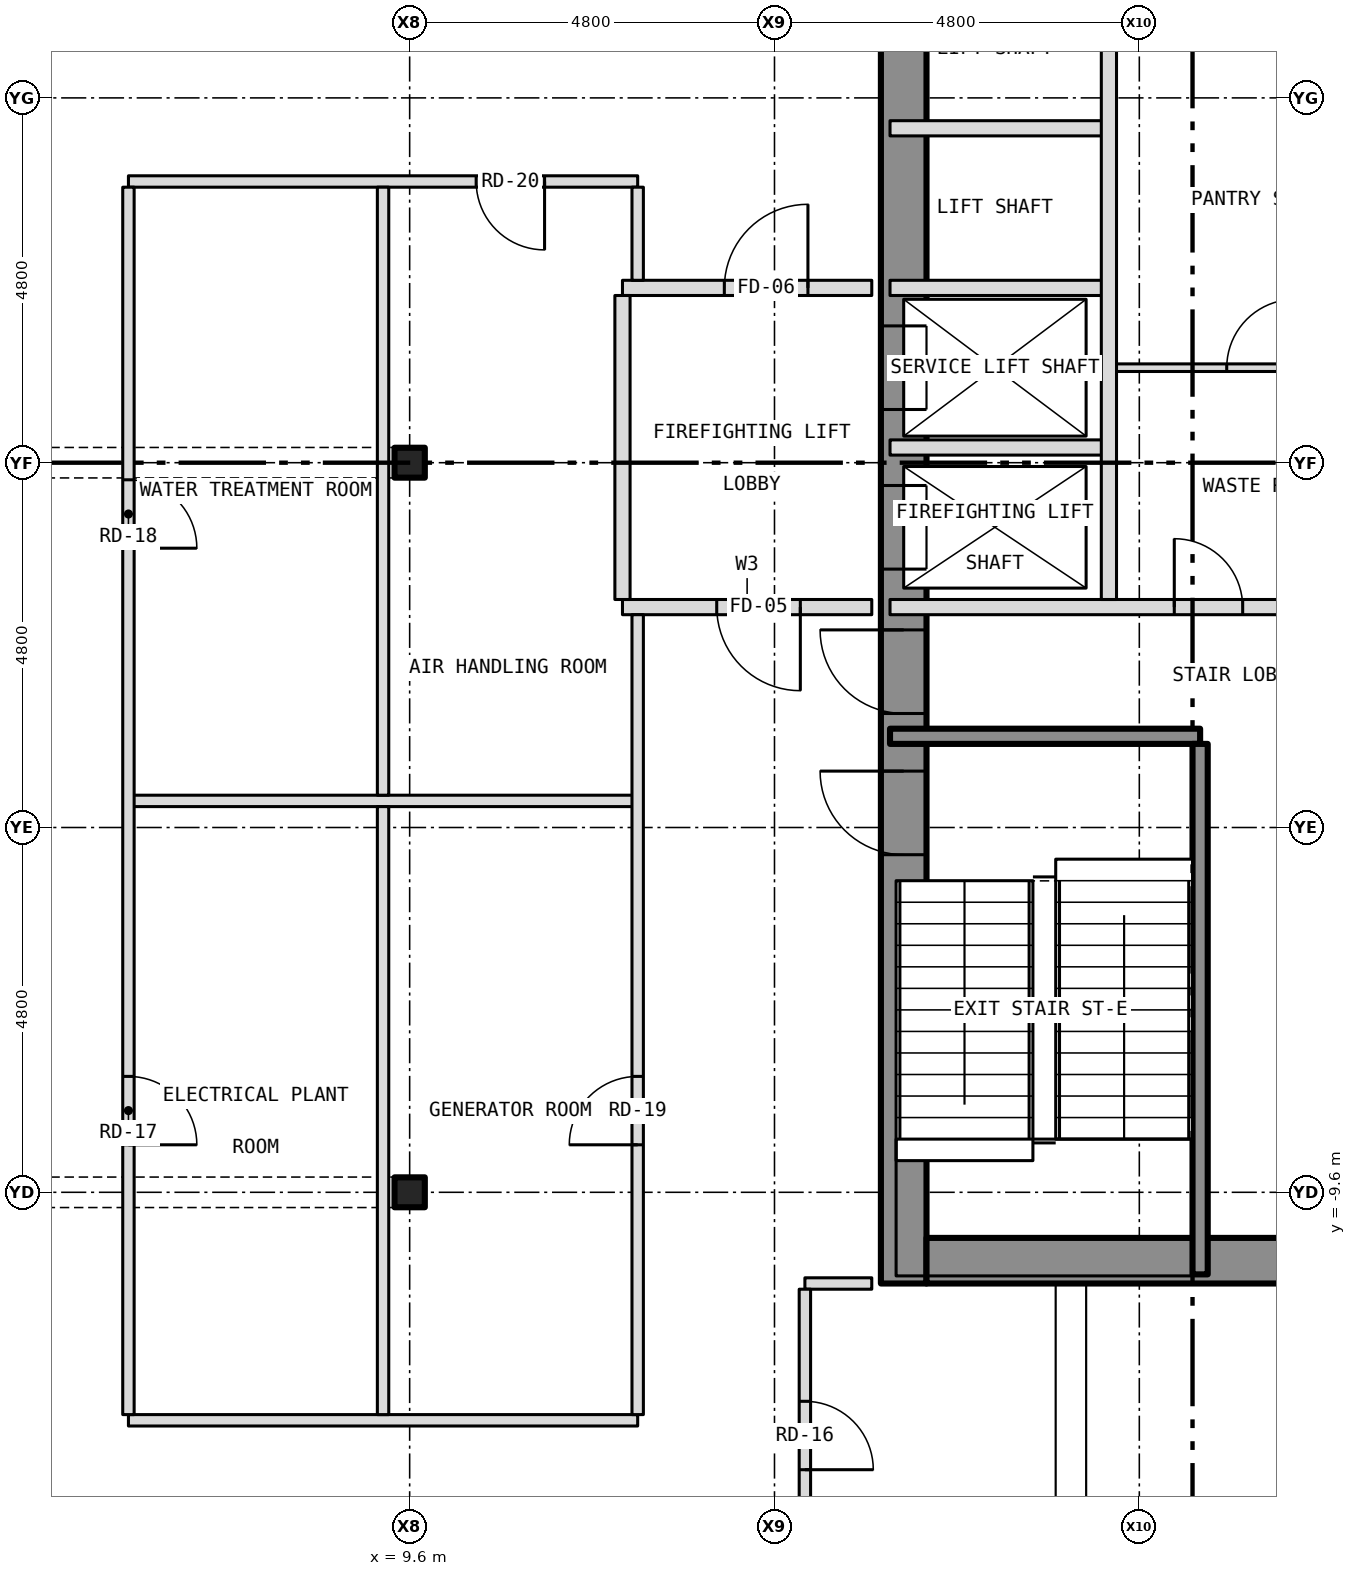
"""IFC4 building model, lengths in metres.
Left out: names, types, materials, properties, quantities, classifications, styles, units other than length and angle.
Written with IfcOpenShell. Run it as: python <this file> out.ifc"""

import sys

from ifc_helpers import new_model, si_unit, direction, frame, frame_2d, origin, origin_2d, place, context, subcontext, project, spatial, rectangle, i_section, extrude, element, fill, save


model = new_model("IFC4")
c1 = context("Model", 3, precision=1e-05, world=origin(), true_north=direction((0.0, 1.0)))
c2 = subcontext(c1, "Body", "Model", "MODEL_VIEW")
j1 = project(units=[si_unit("LENGTHUNIT", "METRE"), si_unit("PLANEANGLEUNIT", "RADIAN")], contexts=[c1])
p1 = place(None, origin())
s1 = spatial("IfcSite", under=j1, at=p1, CompositionType="ELEMENT")
p2 = place(p1, origin())
s2 = spatial("IfcBuilding", under=s1, at=p2, CompositionType="ELEMENT")
p3 = place(p2, frame((0.0, 0.0, 138.0)))
s3 = spatial("IfcBuildingStorey", under=s2, at=p3, CompositionType="ELEMENT", Elevation=138.0)
for number, where, z_axis, x_axis in (
    (1, (9.6, -9.6, -0.3), (0.0, 0.0, 1.0), (1.0, 0.0, 0.0)),
    (2, (9.6, 0.0, -0.3), (0.0, 0.0, 1.0), (1.0, 0.0, 0.0)),
):
    element("IfcColumn", number, at=place(p3, frame(where, z_axis=z_axis, x_axis=x_axis)), inside=s3, PredefinedType="COLUMN", context=c2, shape_type="SweptSolid", body=[
        extrude(i_section(OverallWidth=0.399, OverallDepth=0.394, WebThickness=0.023, FlangeThickness=0.037, at=origin_2d()), origin(), (0.0, 0.0, 1.0), 4.6),
    ])
p4 = place(p3, frame((16.1, -10.8, 0.0), z_axis=(0.0, 0.0, 1.0), x_axis=(0.0, 1.0, 0.0)))
e3 = element("IfcWall", 3, at=p4, inside=s3, PredefinedType="SHEAR", context=c2, shape_type="SweptSolid", body=[
    extrude(rectangle(XDim=21.6, YDim=0.6, at=frame_2d((10.8, 0.0))), origin(), (0.0, 0.0, 1.0), 3.9),
])
p5 = place(p4, frame((9.4, 0.0, 0.0)))
e4 = element("IfcOpeningElement", 4, at=p5, cuts=e3, PredefinedType="OPENING", context=c2, shape_type="SweptSolid", body=[
    extrude(rectangle(XDim=1.1, YDim=2.1, at=frame_2d((0.55, 1.05))), frame((0.0, 0.312, 0.0), z_axis=(0.0, -1.0, 0.0), x_axis=(1.0, 0.0, 0.0)), (0.0, 0.0, 1.0), 0.624),
])
p6 = place(p4, frame((11.5, 0.0, 0.0)))
e5 = element("IfcOpeningElement", 5, at=p6, cuts=e3, PredefinedType="OPENING", context=c2, shape_type="SweptSolid", body=[
    extrude(rectangle(XDim=1.1, YDim=2.1, at=frame_2d((0.55, 1.05))), frame((0.0, 0.312, 0.0), z_axis=(0.0, -1.0, 0.0), x_axis=(1.0, 0.0, 0.0)), (0.0, 0.0, 1.0), 0.624),
])
p7 = place(p4, frame((5.642, 0.0, 0.0)))
e6 = element("IfcOpeningElement", 6, at=p7, cuts=e3, PredefinedType="OPENING", context=c2, shape_type="SweptSolid", body=[
    extrude(rectangle(XDim=1.1, YDim=2.1, at=frame_2d((0.55, 1.05))), frame((0.0, 0.312, 0.0), z_axis=(0.0, -1.0, 0.0), x_axis=(1.0, 0.0, 0.0)), (0.0, 0.0, 1.0), 0.624),
])
p8 = place(p4, frame((7.5, 0.0, 0.0)))
e7 = element("IfcOpeningElement", 7, at=p8, cuts=e3, PredefinedType="OPENING", context=c2, shape_type="SweptSolid", body=[
    extrude(rectangle(XDim=1.1, YDim=2.1, at=frame_2d((0.55, 1.05))), frame((0.0, 0.312, 0.0), z_axis=(0.0, -1.0, 0.0), x_axis=(1.0, 0.0, 0.0)), (0.0, 0.0, 1.0), 0.624),
])
p9 = place(p3, frame((16.4, -10.5, 0.0), z_axis=(0.0, 0.0, 1.0), x_axis=(1.0, 0.0, 0.0)))
e8 = element("IfcWall", 8, at=p9, inside=s3, PredefinedType="SHEAR", context=c2, shape_type="SweptSolid", body=[
    extrude(rectangle(XDim=5.8, YDim=0.6, at=frame_2d((2.9, 0.0))), origin(), (0.0, 0.0, 1.0), 3.9),
])
p10 = place(p3, frame((5.9, -12.6, 0.0), z_axis=(0.0, 0.0, 1.0), x_axis=(1.0, 0.0, 0.0)))
e9 = element("IfcWall", 9, at=p10, inside=s3, PredefinedType="PARTITIONING", context=c2, shape_type="SweptSolid", body=[
    extrude(rectangle(XDim=6.7, YDim=0.15, at=frame_2d((3.35, 0.0))), origin(), (0.0, 0.0, 1.0), 4.3),
])
p11 = place(p3, frame((14.8, -10.8, 0.0), z_axis=(0.0, 0.0, 1.0), x_axis=(1.0, 0.0, 0.0)))
e10 = element("IfcWall", 10, at=p11, inside=s3, PredefinedType="PARTITIONING", context=c2, shape_type="SweptSolid", body=[
    extrude(rectangle(XDim=0.88, YDim=0.15, at=frame_2d((0.44, 0.0))), origin(), (0.0, 0.0, 1.0), 4.3),
])
p12 = place(p3, frame((5.9, -4.45, 0.0), z_axis=(0.0, 0.0, 1.0), x_axis=(1.0, 0.0, 0.0)))
e11 = element("IfcWall", 11, at=p12, inside=s3, PredefinedType="PARTITIONING", context=c2, shape_type="SweptSolid", body=[
    extrude(rectangle(XDim=6.7, YDim=0.15, at=frame_2d((3.35, 0.0))), origin(), (0.0, 0.0, 1.0), 4.3),
])
p13 = place(p3, frame((15.92, -3.6, 0.0), z_axis=(0.0, 0.0, 1.0), x_axis=(1.0, 0.0, 0.0)))
e12 = element("IfcWall", 12, at=p13, inside=s3, PredefinedType="SHEAR", context=c2, shape_type="SweptSolid", body=[
    extrude(rectangle(XDim=4.08, YDim=0.2, at=frame_2d((2.04, 0.0))), origin(), (0.0, 0.0, 1.0), 3.9),
])
p14 = place(p3, frame((12.4, -1.9, 0.0), z_axis=(0.0, 0.0, 1.0), x_axis=(1.0, 0.0, 0.0)))
e13 = element("IfcWall", 13, at=p14, inside=s3, PredefinedType="PARTITIONING", context=c2, shape_type="SweptSolid", body=[
    extrude(rectangle(XDim=3.28, YDim=0.2, at=frame_2d((1.64, 0.0))), origin(), (0.0, 0.0, 1.0), 4.3),
])
p15 = place(p14, frame((1.24, 0.0, 0.0)))
e14 = element("IfcOpeningElement", 14, at=p15, cuts=e13, PredefinedType="OPENING", context=c2, shape_type="SweptSolid", body=[
    extrude(rectangle(XDim=1.1, YDim=2.1, at=frame_2d((0.55, 1.05))), frame((0.0, 0.112, 0.0), z_axis=(0.0, -1.0, 0.0), x_axis=(1.0, 0.0, 0.0)), (0.0, 0.0, 1.0), 0.224),
])
p16 = place(p3, frame((15.92, -1.9, 0.0), z_axis=(0.0, 0.0, 1.0), x_axis=(1.0, 0.0, 0.0)))
e15 = element("IfcWall", 15, at=p16, inside=s3, PredefinedType="PARTITIONING", context=c2, shape_type="SweptSolid", body=[
    extrude(rectangle(XDim=6.76, YDim=0.2, at=frame_2d((3.38, 0.0))), origin(), (0.0, 0.0, 1.0), 3.9),
])
p17 = place(p16, frame((3.74, 0.0, 0.0)))
e16 = element("IfcOpeningElement", 16, at=p17, cuts=e15, PredefinedType="OPENING", context=c2, shape_type="SweptSolid", body=[
    extrude(rectangle(XDim=0.9, YDim=2.1, at=frame_2d((0.45, 1.05))), frame((0.0, 0.112, 0.0), z_axis=(0.0, -1.0, 0.0), x_axis=(1.0, 0.0, 0.0)), (0.0, 0.0, 1.0), 0.224),
])
p18 = place(p3, frame((15.92, 0.2, 0.0), z_axis=(0.0, 0.0, 1.0), x_axis=(1.0, 0.0, 0.0)))
e17 = element("IfcWall", 17, at=p18, inside=s3, PredefinedType="PARTITIONING", context=c2, shape_type="SweptSolid", body=[
    extrude(rectangle(XDim=2.88, YDim=0.2, at=frame_2d((1.44, 0.0))), origin(), (0.0, 0.0, 1.0), 3.9),
])
p19 = place(p3, frame((18.8, 1.25, 0.0), z_axis=(0.0, 0.0, 1.0), x_axis=(1.0, 0.0, 0.0)))
e18 = element("IfcWall", 18, at=p19, inside=s3, PredefinedType="PARTITIONING", context=c2, shape_type="SweptSolid", body=[
    extrude(rectangle(XDim=3.88, YDim=0.1, at=frame_2d((1.94, 0.0))), origin(), (0.0, 0.0, 1.0), 3.9),
])
p20 = place(p19, frame((1.55, 0.0, 0.0)))
e19 = element("IfcOpeningElement", 19, at=p20, cuts=e18, PredefinedType="OPENING", context=c2, shape_type="SweptSolid", body=[
    extrude(rectangle(XDim=0.9, YDim=2.1, at=frame_2d((0.45, 1.05))), frame((0.0, 0.062, 0.0), z_axis=(0.0, -1.0, 0.0), x_axis=(1.0, 0.0, 0.0)), (0.0, 0.0, 1.0), 0.124),
])
p21 = place(p3, frame((12.4, 2.3, 0.0), z_axis=(0.0, 0.0, 1.0), x_axis=(1.0, 0.0, 0.0)))
e20 = element("IfcWall", 20, at=p21, inside=s3, PredefinedType="PARTITIONING", context=c2, shape_type="SweptSolid", body=[
    extrude(rectangle(XDim=3.28, YDim=0.2, at=frame_2d((1.64, 0.0))), origin(), (0.0, 0.0, 1.0), 4.3),
])
p22 = place(p21, frame((1.34, 0.0, 0.0)))
e21 = element("IfcOpeningElement", 21, at=p22, cuts=e20, PredefinedType="OPENING", context=c2, shape_type="SweptSolid", body=[
    extrude(rectangle(XDim=1.1, YDim=2.1, at=frame_2d((0.55, 1.05))), frame((0.0, 0.112, 0.0), z_axis=(0.0, -1.0, 0.0), x_axis=(1.0, 0.0, 0.0)), (0.0, 0.0, 1.0), 0.224),
])
p23 = place(p3, frame((15.92, 2.3, 0.0), z_axis=(0.0, 0.0, 1.0), x_axis=(1.0, 0.0, 0.0)))
e22 = element("IfcWall", 22, at=p23, inside=s3, PredefinedType="PARTITIONING", context=c2, shape_type="SweptSolid", body=[
    extrude(rectangle(XDim=2.88, YDim=0.2, at=frame_2d((1.44, 0.0))), origin(), (0.0, 0.0, 1.0), 3.9),
])
p24 = place(p3, frame((5.9, 3.7, 0.0), z_axis=(0.0, 0.0, 1.0), x_axis=(1.0, 0.0, 0.0)))
e23 = element("IfcWall", 23, at=p24, inside=s3, PredefinedType="PARTITIONING", context=c2, shape_type="SweptSolid", body=[
    extrude(rectangle(XDim=6.7, YDim=0.15, at=frame_2d((3.35, 0.0))), origin(), (0.0, 0.0, 1.0), 4.3),
])
p25 = place(p24, frame((4.575, 0.0, 0.0)))
e24 = element("IfcOpeningElement", 24, at=p25, cuts=e23, PredefinedType="OPENING", context=c2, shape_type="SweptSolid", body=[
    extrude(rectangle(XDim=0.9, YDim=2.1, at=frame_2d((0.45, 1.05))), frame((0.0, 0.087, 0.0), z_axis=(0.0, -1.0, 0.0), x_axis=(1.0, 0.0, 0.0)), (0.0, 0.0, 1.0), 0.174),
])
p26 = place(p3, frame((15.92, 4.4, 0.0), z_axis=(0.0, 0.0, 1.0), x_axis=(1.0, 0.0, 0.0)))
e25 = element("IfcWall", 25, at=p26, inside=s3, PredefinedType="PARTITIONING", context=c2, shape_type="SweptSolid", body=[
    extrude(rectangle(XDim=2.88, YDim=0.2, at=frame_2d((1.44, 0.0))), origin(), (0.0, 0.0, 1.0), 3.9),
])
p27 = place(p3, frame((5.9, -12.525, 0.0), z_axis=(0.0, 0.0, 1.0), x_axis=(0.0, 1.0, 0.0)))
e26 = element("IfcWall", 26, at=p27, inside=s3, PredefinedType="PARTITIONING", context=c2, shape_type="SweptSolid", body=[
    extrude(rectangle(XDim=16.15, YDim=0.15, at=frame_2d((8.075, 0.0))), origin(), (0.0, 0.0, 1.0), 4.3),
])
p28 = place(p27, frame((3.55, 0.0, 0.0)))
e27 = element("IfcOpeningElement", 27, at=p28, cuts=e26, PredefinedType="OPENING", context=c2, shape_type="SweptSolid", body=[
    extrude(rectangle(XDim=0.9, YDim=2.1, at=frame_2d((0.45, 1.05))), frame((0.0, 0.087, 0.0), z_axis=(0.0, -1.0, 0.0), x_axis=(1.0, 0.0, 0.0)), (0.0, 0.0, 1.0), 0.174),
])
p29 = place(p27, frame((11.4, 0.0, 0.0)))
e28 = element("IfcOpeningElement", 28, at=p29, cuts=e26, PredefinedType="OPENING", context=c2, shape_type="SweptSolid", body=[
    extrude(rectangle(XDim=0.9, YDim=2.1, at=frame_2d((0.45, 1.05))), frame((0.0, 0.087, 0.0), z_axis=(0.0, -1.0, 0.0), x_axis=(1.0, 0.0, 0.0)), (0.0, 0.0, 1.0), 0.174),
])
for number, where, z_axis, x_axis in (
    (29, (9.25, -12.525, 0.0), (0.0, 0.0, 1.0), (0.0, 1.0, 0.0)),
    (30, (9.25, -4.375, 0.0), (0.0, 0.0, 1.0), (0.0, 1.0, 0.0)),
):
    element("IfcWall", number, at=place(p3, frame(where, z_axis=z_axis, x_axis=x_axis)), inside=s3, PredefinedType="PARTITIONING", context=c2, shape_type="SweptSolid", body=[
        extrude(rectangle(XDim=8.0, YDim=0.15, at=frame_2d((4.0, 0.0))), origin(), (0.0, 0.0, 1.0), 4.3),
    ])
p30 = place(p3, frame((12.4, -1.8, 0.0), z_axis=(0.0, 0.0, 1.0), x_axis=(0.0, 1.0, 0.0)))
e31 = element("IfcWall", 31, at=p30, inside=s3, PredefinedType="PARTITIONING", context=c2, shape_type="SweptSolid", body=[
    extrude(rectangle(XDim=4.0, YDim=0.2, at=frame_2d((2.0, 0.0))), origin(), (0.0, 0.0, 1.0), 4.3),
])
p31 = place(p3, frame((12.6, -12.525, 0.0), z_axis=(0.0, 0.0, 1.0), x_axis=(0.0, 1.0, 0.0)))
e32 = element("IfcWall", 32, at=p31, inside=s3, PredefinedType="PARTITIONING", context=c2, shape_type="SweptSolid", body=[
    extrude(rectangle(XDim=10.525, YDim=0.15, at=frame_2d((5.262, 0.0))), origin(), (0.0, 0.0, 1.0), 4.3),
])
p32 = place(p31, frame((3.55, 0.0, 0.0)))
e33 = element("IfcOpeningElement", 33, at=p32, cuts=e32, PredefinedType="OPENING", context=c2, shape_type="SweptSolid", body=[
    extrude(rectangle(XDim=0.9, YDim=2.1, at=frame_2d((0.45, 1.05))), frame((0.0, 0.087, 0.0), z_axis=(0.0, -1.0, 0.0), x_axis=(1.0, 0.0, 0.0)), (0.0, 0.0, 1.0), 0.174),
])
p33 = place(p3, frame((12.6, 2.4, 0.0), z_axis=(0.0, 0.0, 1.0), x_axis=(0.0, 1.0, 0.0)))
e34 = element("IfcWall", 34, at=p33, inside=s3, PredefinedType="PARTITIONING", context=c2, shape_type="SweptSolid", body=[
    extrude(rectangle(XDim=1.225, YDim=0.15, at=frame_2d((0.613, 0.0))), origin(), (0.0, 0.0, 1.0), 4.3),
])
p34 = place(p3, frame((14.8, -14.725, 0.0), z_axis=(0.0, 0.0, 1.0), x_axis=(0.0, 1.0, 0.0)))
e35 = element("IfcWall", 35, at=p34, inside=s3, PredefinedType="PARTITIONING", context=c2, shape_type="SweptSolid", body=[
    extrude(rectangle(XDim=3.85, YDim=0.15, at=frame_2d((1.925, 0.0))), origin(), (0.0, 0.0, 1.0), 4.3),
])
p35 = place(p34, frame((1.475, 0.0, 0.0)))
e36 = element("IfcOpeningElement", 36, at=p35, cuts=e35, PredefinedType="OPENING", context=c2, shape_type="SweptSolid", body=[
    extrude(rectangle(XDim=0.9, YDim=2.1, at=frame_2d((0.45, 1.05))), frame((0.0, 0.087, 0.0), z_axis=(0.0, -1.0, 0.0), x_axis=(1.0, 0.0, 0.0)), (0.0, 0.0, 1.0), 0.174),
])
p36 = place(p3, frame((18.8, -1.8, 0.0), z_axis=(0.0, 0.0, 1.0), x_axis=(0.0, 1.0, 0.0)))
e37 = element("IfcWall", 37, at=p36, inside=s3, PredefinedType="PARTITIONING", context=c2, shape_type="SweptSolid", body=[
    extrude(rectangle(XDim=12.48, YDim=0.2, at=frame_2d((6.24, 0.0))), origin(), (0.0, 0.0, 1.0), 3.9),
])
p37 = place(p3, frame((20.0, -10.68, 0.0), z_axis=(0.0, 0.0, 1.0), x_axis=(0.0, 1.0, 0.0)))
e38 = element("IfcWall", 38, at=p37, inside=s3, PredefinedType="SHEAR", context=c2, shape_type="SweptSolid", body=[
    extrude(rectangle(XDim=6.98, YDim=0.2, at=frame_2d((3.49, 0.0))), origin(), (0.0, 0.0, 1.0), 3.9),
])
p38 = place(p5, origin())
e39 = element("IfcDoor", 39, at=p38, inside=s3, OperationType="SLIDING_TO_LEFT", PredefinedType="DOOR", context=c2, shape_type="SweptSolid", body=[
    extrude(rectangle(XDim=1.1, YDim=2.1, at=frame_2d((0.55, 1.05))), frame((0.0, 0.025, 0.0), z_axis=(0.0, -1.0, 0.0), x_axis=(1.0, 0.0, 0.0)), (0.0, 0.0, 1.0), 0.05),
])
fill(e4, e39)
p39 = place(p6, origin())
e40 = element("IfcDoor", 40, at=p39, inside=s3, OperationType="SLIDING_TO_LEFT", PredefinedType="DOOR", context=c2, shape_type="SweptSolid", body=[
    extrude(rectangle(XDim=1.1, YDim=2.1, at=frame_2d((0.55, 1.05))), frame((0.0, 0.025, 0.0), z_axis=(0.0, -1.0, 0.0), x_axis=(1.0, 0.0, 0.0)), (0.0, 0.0, 1.0), 0.05),
])
fill(e5, e40)
p40 = place(p7, origin())
e41 = element("IfcDoor", 41, at=p40, inside=s3, OperationType="SINGLE_SWING_RIGHT", PredefinedType="DOOR", context=c2, shape_type="SweptSolid", body=[
    extrude(rectangle(XDim=1.1, YDim=2.1, at=frame_2d((0.55, 1.05))), frame((0.0, 0.025, 0.0), z_axis=(0.0, -1.0, 0.0), x_axis=(1.0, 0.0, 0.0)), (0.0, 0.0, 1.0), 0.05),
])
fill(e6, e41)
p41 = place(p8, origin())
e42 = element("IfcDoor", 42, at=p41, inside=s3, OperationType="SINGLE_SWING_RIGHT", PredefinedType="DOOR", context=c2, shape_type="SweptSolid", body=[
    extrude(rectangle(XDim=1.1, YDim=2.1, at=frame_2d((0.55, 1.05))), frame((0.0, 0.025, 0.0), z_axis=(0.0, -1.0, 0.0), x_axis=(1.0, 0.0, 0.0)), (0.0, 0.0, 1.0), 0.05),
])
fill(e7, e42)
p42 = place(p17, origin())
e43 = element("IfcDoor", 43, at=p42, inside=s3, OperationType="SINGLE_SWING_LEFT", PredefinedType="DOOR", context=c2, shape_type="SweptSolid", body=[
    extrude(rectangle(XDim=0.9, YDim=2.1, at=frame_2d((0.45, 1.05))), frame((0.0, 0.025, 0.0), z_axis=(0.0, -1.0, 0.0), x_axis=(1.0, 0.0, 0.0)), (0.0, 0.0, 1.0), 0.05),
])
fill(e16, e43)
p43 = place(p20, origin())
e44 = element("IfcDoor", 44, at=p43, inside=s3, OperationType="SINGLE_SWING_RIGHT", PredefinedType="DOOR", context=c2, shape_type="SweptSolid", body=[
    extrude(rectangle(XDim=0.9, YDim=2.1, at=frame_2d((0.45, 1.05))), frame((0.0, 0.025, 0.0), z_axis=(0.0, -1.0, 0.0), x_axis=(1.0, 0.0, 0.0)), (0.0, 0.0, 1.0), 0.05),
])
fill(e19, e44)
p44 = place(p15, origin())
e45 = element("IfcDoor", 45, at=p44, inside=s3, OperationType="SINGLE_SWING_RIGHT", PredefinedType="DOOR", context=c2, shape_type="SweptSolid", body=[
    extrude(rectangle(XDim=1.1, YDim=2.1, at=frame_2d((0.55, 1.05))), frame((0.0, 0.025, 0.0), z_axis=(0.0, -1.0, 0.0), x_axis=(1.0, 0.0, 0.0)), (0.0, 0.0, 1.0), 0.05),
])
fill(e14, e45)
p45 = place(p22, origin())
e46 = element("IfcDoor", 46, at=p45, inside=s3, OperationType="SINGLE_SWING_RIGHT", PredefinedType="DOOR", context=c2, shape_type="SweptSolid", body=[
    extrude(rectangle(XDim=1.1, YDim=2.1, at=frame_2d((0.55, 1.05))), frame((0.0, 0.025, 0.0), z_axis=(0.0, -1.0, 0.0), x_axis=(1.0, 0.0, 0.0)), (0.0, 0.0, 1.0), 0.05),
])
fill(e21, e46)
p46 = place(p35, origin())
e47 = element("IfcDoor", 47, at=p46, inside=s3, OperationType="SINGLE_SWING_LEFT", PredefinedType="DOOR", context=c2, shape_type="SweptSolid", body=[
    extrude(rectangle(XDim=0.9, YDim=2.1, at=frame_2d((0.45, 1.05))), frame((0.0, 0.025, 0.0), z_axis=(0.0, -1.0, 0.0), x_axis=(1.0, 0.0, 0.0)), (0.0, 0.0, 1.0), 0.05),
])
fill(e36, e47)
p47 = place(p28, origin())
e48 = element("IfcDoor", 48, at=p47, inside=s3, OperationType="SINGLE_SWING_LEFT", PredefinedType="DOOR", context=c2, shape_type="SweptSolid", body=[
    extrude(rectangle(XDim=0.9, YDim=2.1, at=frame_2d((0.45, 1.05))), frame((0.0, 0.025, 0.0), z_axis=(0.0, -1.0, 0.0), x_axis=(1.0, 0.0, 0.0)), (0.0, 0.0, 1.0), 0.05),
])
fill(e27, e48)
p48 = place(p29, origin())
e49 = element("IfcDoor", 49, at=p48, inside=s3, OperationType="SINGLE_SWING_LEFT", PredefinedType="DOOR", context=c2, shape_type="SweptSolid", body=[
    extrude(rectangle(XDim=0.9, YDim=2.1, at=frame_2d((0.45, 1.05))), frame((0.0, 0.025, 0.0), z_axis=(0.0, -1.0, 0.0), x_axis=(1.0, 0.0, 0.0)), (0.0, 0.0, 1.0), 0.05),
])
fill(e28, e49)
p49 = place(p32, origin())
e50 = element("IfcDoor", 50, at=p49, inside=s3, OperationType="SINGLE_SWING_LEFT", PredefinedType="DOOR", context=c2, shape_type="SweptSolid", body=[
    extrude(rectangle(XDim=0.9, YDim=2.1, at=frame_2d((0.45, 1.05))), frame((0.0, 0.025, 0.0), z_axis=(0.0, -1.0, 0.0), x_axis=(1.0, 0.0, 0.0)), (0.0, 0.0, 1.0), 0.05),
])
fill(e33, e50)
p50 = place(p25, origin())
e51 = element("IfcDoor", 51, at=p50, inside=s3, OperationType="SINGLE_SWING_RIGHT", PredefinedType="DOOR", context=c2, shape_type="SweptSolid", body=[
    extrude(rectangle(XDim=0.9, YDim=2.1, at=frame_2d((0.45, 1.05))), frame((0.0, 0.025, 0.0), z_axis=(0.0, -1.0, 0.0), x_axis=(1.0, 0.0, 0.0)), (0.0, 0.0, 1.0), 0.05),
])
fill(e24, e51)
save(model, sys.argv[1])
